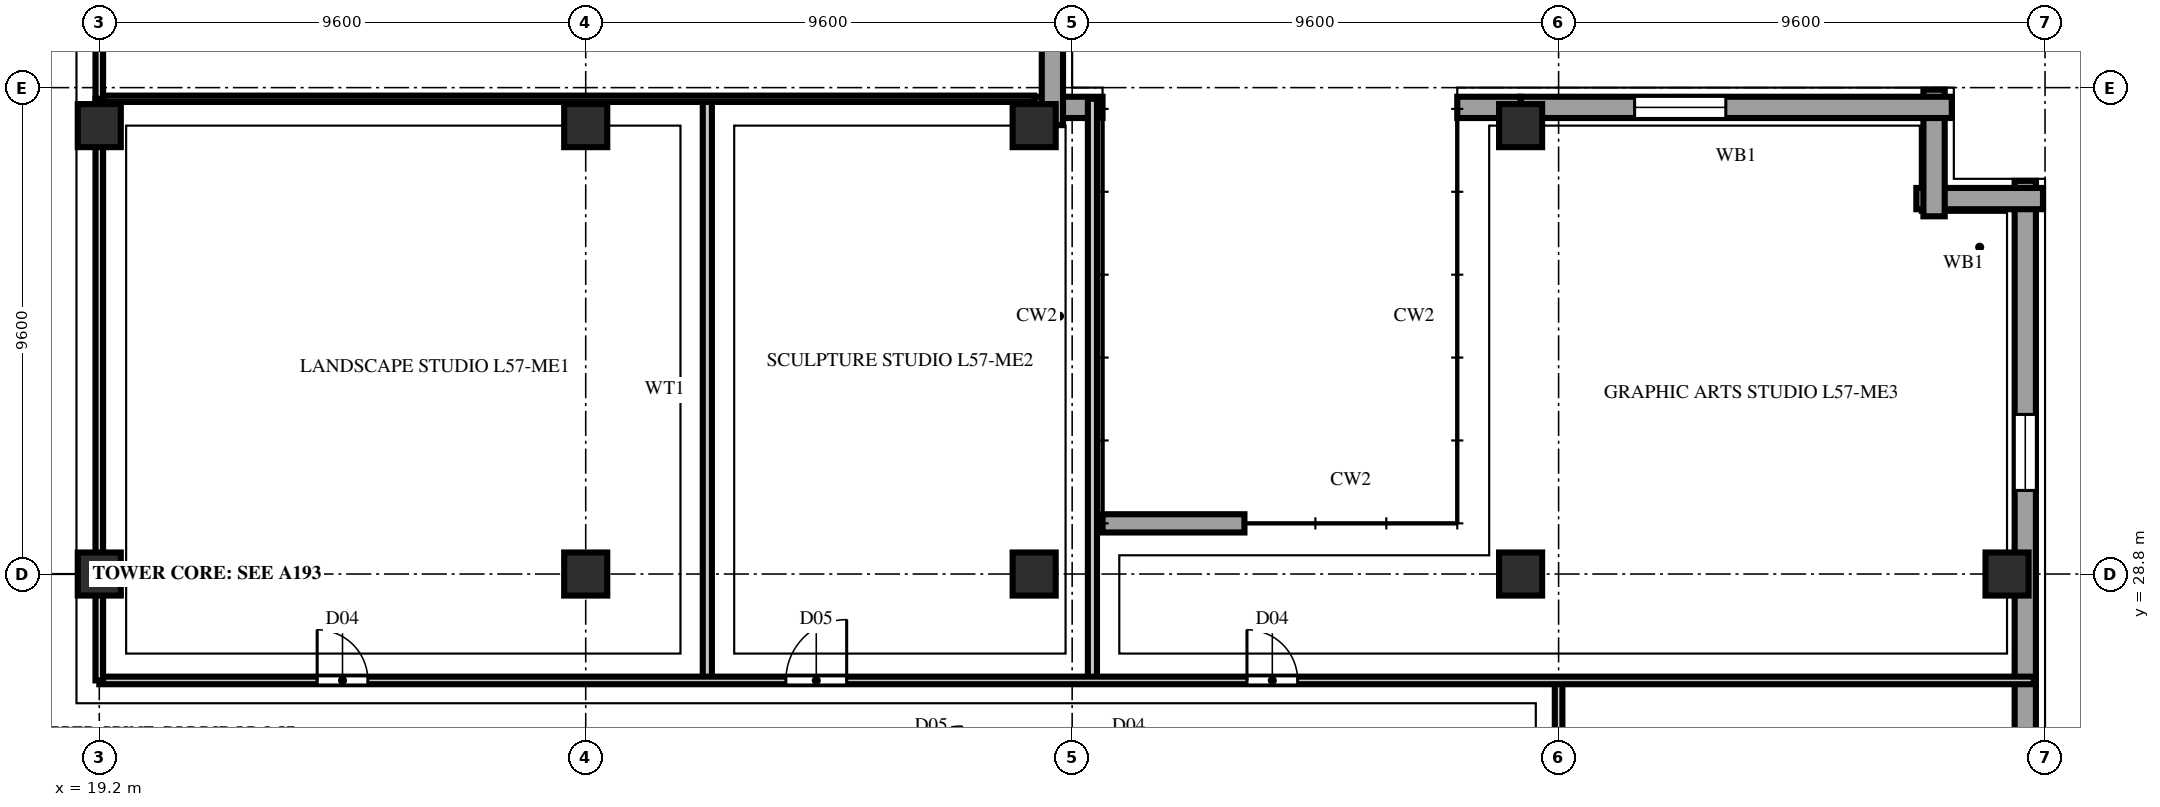
"""IFC4 building model, lengths in metres.
Left out: names, types, materials, properties, quantities, classifications, styles, units other than length and angle.
Written with IfcOpenShell. Run it as: python <this file> out.ifc"""

import sys

from ifc_helpers import new_model, si_unit, direction, frame, frame_2d, origin, origin_2d, place, context, subcontext, project, spatial, rectangle, extrude, element, fill, save


model = new_model("IFC4")
c1 = context("Model", 3, precision=1e-05, world=origin(), true_north=direction((0.0, 1.0)))
c2 = subcontext(c1, "Body", "Model", "MODEL_VIEW")
j1 = project(units=[si_unit("LENGTHUNIT", "METRE"), si_unit("PLANEANGLEUNIT", "RADIAN")], contexts=[c1])
p1 = place(None, origin())
s1 = spatial("IfcSite", under=j1, at=p1, CompositionType="ELEMENT")
p2 = place(p1, origin())
s2 = spatial("IfcBuilding", under=s1, at=p2, CompositionType="ELEMENT")
p3 = place(p2, frame((0.0, 0.0, 225.6)))
s3 = spatial("IfcBuildingStorey", under=s2, at=p3, CompositionType="ELEMENT", Elevation=225.6)
for number, where, z_axis, x_axis in (
    (1, (19.2, 28.8, 0.0), (0.0, 0.0, 1.0), (1.0, 0.0, 0.0)),
    (2, (19.2, 37.65, 0.0), (0.0, 0.0, 1.0), (1.0, 0.0, 0.0)),
    (3, (28.8, 28.8, 0.0), (0.0, 0.0, 1.0), (1.0, 0.0, 0.0)),
    (4, (28.8, 37.65, 0.0), (0.0, 0.0, 1.0), (1.0, 0.0, 0.0)),
    (5, (37.65, 28.8, 0.0), (0.0, 0.0, 1.0), (1.0, 0.0, 0.0)),
    (6, (37.65, 37.65, 0.0), (0.0, 0.0, 1.0), (1.0, 0.0, 0.0)),
    (7, (47.25, 28.8, 0.0), (0.0, 0.0, 1.0), (1.0, 0.0, 0.0)),
    (8, (47.25, 37.65, 0.0), (0.0, 0.0, 1.0), (1.0, 0.0, 0.0)),
    (9, (56.85, 28.8, 0.0), (0.0, 0.0, 1.0), (1.0, 0.0, 0.0)),
):
    element("IfcColumn", number, at=place(p3, frame(where, z_axis=z_axis, x_axis=x_axis)), inside=s3, PredefinedType="COLUMN", context=c2, shape_type="SweptSolid", body=[
        extrude(rectangle(XDim=0.85, YDim=0.85, at=origin_2d()), origin(), (0.0, 0.0, 1.0), 3.8),
    ])
p4 = place(p3, frame((57.21, 1.84, 0.0), z_axis=(0.0, 0.0, 1.0), x_axis=(0.0, 1.0, 0.0)))
e10 = element("IfcWall", 10, at=p4, inside=s3, PredefinedType="SOLIDWALL", context=c2, shape_type="SweptSolid", body=[
    extrude(rectangle(XDim=34.72, YDim=0.42, at=frame_2d((17.36, 0.0))), origin(), (0.0, 0.0, 1.0), 3.54),
])
p5 = place(p4, frame((4.61, 0.0, 0.85)))
e11 = element("IfcOpeningElement", 11, at=p5, cuts=e10, PredefinedType="OPENING", context=c2, shape_type="SweptSolid", body=[
    extrude(rectangle(XDim=1.5, YDim=1.85, at=frame_2d((0.75, 0.925))), frame((0.0, 0.222, 0.0), z_axis=(0.0, -1.0, 0.0), x_axis=(1.0, 0.0, 0.0)), (0.0, 0.0, 1.0), 0.444),
])
p6 = place(p4, frame((9.41, 0.0, 0.85)))
e12 = element("IfcOpeningElement", 12, at=p6, cuts=e10, PredefinedType="OPENING", context=c2, shape_type="SweptSolid", body=[
    extrude(rectangle(XDim=1.5, YDim=1.85, at=frame_2d((0.75, 0.925))), frame((0.0, 0.222, 0.0), z_axis=(0.0, -1.0, 0.0), x_axis=(1.0, 0.0, 0.0)), (0.0, 0.0, 1.0), 0.444),
])
p7 = place(p4, frame((14.21, 0.0, 0.85)))
e13 = element("IfcOpeningElement", 13, at=p7, cuts=e10, PredefinedType="OPENING", context=c2, shape_type="SweptSolid", body=[
    extrude(rectangle(XDim=1.5, YDim=1.85, at=frame_2d((0.75, 0.925))), frame((0.0, 0.222, 0.0), z_axis=(0.0, -1.0, 0.0), x_axis=(1.0, 0.0, 0.0)), (0.0, 0.0, 1.0), 0.444),
])
p8 = place(p4, frame((19.01, 0.0, 0.85)))
e14 = element("IfcOpeningElement", 14, at=p8, cuts=e10, PredefinedType="OPENING", context=c2, shape_type="SweptSolid", body=[
    extrude(rectangle(XDim=1.5, YDim=1.85, at=frame_2d((0.75, 0.925))), frame((0.0, 0.222, 0.0), z_axis=(0.0, -1.0, 0.0), x_axis=(1.0, 0.0, 0.0)), (0.0, 0.0, 1.0), 0.444),
])
p9 = place(p4, frame((28.61, 0.0, 0.85)))
e15 = element("IfcOpeningElement", 15, at=p9, cuts=e10, PredefinedType="OPENING", context=c2, shape_type="SweptSolid", body=[
    extrude(rectangle(XDim=1.5, YDim=1.85, at=frame_2d((0.75, 0.925))), frame((0.0, 0.222, 0.0), z_axis=(0.0, -1.0, 0.0), x_axis=(1.0, 0.0, 0.0)), (0.0, 0.0, 1.0), 0.444),
])
for number, where, z_axis, x_axis in (
    (16, (57.56, 36.21, 0.0), (0.0, 0.0, 1.0), (-1.0, 0.0, 0.0)),
    (17, (55.41, 35.86, 0.0), (0.0, 0.0, 1.0), (0.0, 1.0, 0.0)),
):
    element("IfcWall", number, at=place(p3, frame(where, z_axis=z_axis, x_axis=x_axis)), inside=s3, PredefinedType="SOLIDWALL", context=c2, shape_type="SweptSolid", body=[
        extrude(rectangle(XDim=2.5, YDim=0.42, at=frame_2d((1.25, 0.0))), origin(), (0.0, 0.0, 1.0), 3.54),
    ])
p10 = place(p3, frame((55.76, 38.01, 0.0), z_axis=(0.0, 0.0, 1.0), x_axis=(-1.0, 0.0, 0.0)))
e18 = element("IfcWall", 18, at=p10, inside=s3, PredefinedType="SOLIDWALL", context=c2, shape_type="SweptSolid", body=[
    extrude(rectangle(XDim=8.51, YDim=0.42, at=frame_2d((4.255, 0.0))), origin(), (0.0, 0.0, 1.0), 3.54),
])
p11 = place(p10, frame((4.46, 0.0, 0.85)))
e19 = element("IfcOpeningElement", 19, at=p11, cuts=e18, PredefinedType="OPENING", context=c2, shape_type="SweptSolid", body=[
    extrude(rectangle(XDim=1.8, YDim=1.85, at=frame_2d((0.9, 0.925))), frame((0.0, 0.222, 0.0), z_axis=(0.0, -1.0, 0.0), x_axis=(1.0, 0.0, 0.0)), (0.0, 0.0, 1.0), 0.444),
])
p12 = place(p3, frame((39.0, 38.01, 0.0), z_axis=(0.0, 0.0, 1.0), x_axis=(-1.0, 0.0, 0.0)))
e20 = element("IfcWall", 20, at=p12, inside=s3, PredefinedType="SOLIDWALL", context=c2, shape_type="SweptSolid", body=[
    extrude(rectangle(XDim=1.34, YDim=0.42, at=frame_2d((0.67, 0.0))), origin(), (0.0, 0.0, 1.0), 2.14),
])
p13 = place(p3, frame((38.01, 37.66, 0.0), z_axis=(0.0, 0.0, 1.0), x_axis=(0.0, 1.0, 0.0)))
e21 = element("IfcWall", 21, at=p13, inside=s3, PredefinedType="SOLIDWALL", context=c2, shape_type="SweptSolid", body=[
    extrude(rectangle(XDim=18.1, YDim=0.42, at=frame_2d((9.05, 0.0))), origin(), (0.0, 0.0, 1.0), 3.54),
])
p14 = place(p13, frame((2.24, 0.0, 0.85)))
e22 = element("IfcOpeningElement", 22, at=p14, cuts=e21, PredefinedType="OPENING", context=c2, shape_type="SweptSolid", body=[
    extrude(rectangle(XDim=1.8, YDim=1.85, at=frame_2d((0.9, 0.925))), frame((0.0, 0.222, 0.0), z_axis=(0.0, -1.0, 0.0), x_axis=(1.0, 0.0, 0.0)), (0.0, 0.0, 1.0), 0.444),
])
p15 = place(p13, frame((7.04, 0.0, 0.85)))
e23 = element("IfcOpeningElement", 23, at=p15, cuts=e21, PredefinedType="OPENING", context=c2, shape_type="SweptSolid", body=[
    extrude(rectangle(XDim=1.8, YDim=1.85, at=frame_2d((0.9, 0.925))), frame((0.0, 0.222, 0.0), z_axis=(0.0, -1.0, 0.0), x_axis=(1.0, 0.0, 0.0)), (0.0, 0.0, 1.0), 0.444),
])
p16 = place(p13, frame((11.84, 0.0, 0.85)))
e24 = element("IfcOpeningElement", 24, at=p16, cuts=e21, PredefinedType="OPENING", context=c2, shape_type="SweptSolid", body=[
    extrude(rectangle(XDim=1.8, YDim=1.85, at=frame_2d((0.9, 0.925))), frame((0.0, 0.222, 0.0), z_axis=(0.0, -1.0, 0.0), x_axis=(1.0, 0.0, 0.0)), (0.0, 0.0, 1.0), 0.444),
])
p17 = place(p3, frame((39.0, 29.8, 0.0), z_axis=(0.0, 0.0, 1.0), x_axis=(1.0, 0.0, 0.0)))
e25 = element("IfcWall", 25, at=p17, inside=s3, PredefinedType="SOLIDWALL", context=c2, shape_type="SweptSolid", body=[
    extrude(rectangle(XDim=2.8, YDim=0.36, at=frame_2d((1.4, 0.0))), origin(), (0.0, 0.0, 1.0), 3.54),
])
p18 = place(p3, frame((48.0, 24.6, 0.0), z_axis=(0.0, 0.0, 1.0), x_axis=(0.0, 1.0, 0.0)))
e26 = element("IfcWall", 26, at=p18, inside=s3, PredefinedType="PARTITIONING", context=c2, shape_type="SweptSolid", body=[
    extrude(rectangle(XDim=2.1, YDim=0.15, at=frame_2d((1.05, 0.0))), origin(), (0.0, 0.0, 1.0), 3.54),
])
for number, where, z_axis, x_axis in (
    (27, (31.2, 26.7, 0.0), (0.0, 0.0, 1.0), (0.0, 1.0, 0.0)),
    (28, (38.8, 26.7, 0.0), (0.0, 0.0, 1.0), (0.0, 1.0, 0.0)),
):
    element("IfcWall", number, at=place(p3, frame(where, z_axis=z_axis, x_axis=x_axis)), inside=s3, PredefinedType="PARTITIONING", context=c2, shape_type="SweptSolid", body=[
        extrude(rectangle(XDim=11.48, YDim=0.18, at=frame_2d((5.74, 0.0))), origin(), (0.0, 0.0, 1.0), 3.54),
    ])
p19 = place(p3, frame((19.2, 26.7, 0.0), z_axis=(0.0, 0.0, 1.0), x_axis=(1.0, 0.0, 0.0)))
e29 = element("IfcWall", 29, at=p19, inside=s3, PredefinedType="PARTITIONING", context=c2, shape_type="SweptSolid", body=[
    extrude(rectangle(XDim=38.18, YDim=0.15, at=frame_2d((19.09, 0.0))), origin(), (0.0, 0.0, 1.0), 3.54),
])
p20 = place(p19, frame((4.3, 0.0, 0.0)))
e30 = element("IfcOpeningElement", 30, at=p20, cuts=e29, PredefinedType="OPENING", context=c2, shape_type="SweptSolid", body=[
    extrude(rectangle(XDim=1.0, YDim=2.2, at=frame_2d((0.5, 1.1))), frame((0.0, 0.087, 0.0), z_axis=(0.0, -1.0, 0.0), x_axis=(1.0, 0.0, 0.0)), (0.0, 0.0, 1.0), 0.174),
])
p21 = place(p19, frame((13.55, 0.0, 0.0)))
e31 = element("IfcOpeningElement", 31, at=p21, cuts=e29, PredefinedType="OPENING", context=c2, shape_type="SweptSolid", body=[
    extrude(rectangle(XDim=1.2, YDim=2.2, at=frame_2d((0.6, 1.1))), frame((0.0, 0.087, 0.0), z_axis=(0.0, -1.0, 0.0), x_axis=(1.0, 0.0, 0.0)), (0.0, 0.0, 1.0), 0.174),
])
p22 = place(p19, frame((22.65, 0.0, 0.0)))
e32 = element("IfcOpeningElement", 32, at=p22, cuts=e29, PredefinedType="OPENING", context=c2, shape_type="SweptSolid", body=[
    extrude(rectangle(XDim=1.0, YDim=2.2, at=frame_2d((0.5, 1.1))), frame((0.0, 0.087, 0.0), z_axis=(0.0, -1.0, 0.0), x_axis=(1.0, 0.0, 0.0)), (0.0, 0.0, 1.0), 0.174),
])
p23 = place(p3, frame((19.2, 26.7, 0.0), z_axis=(0.0, 0.0, 1.0), x_axis=(0.0, 1.0, 0.0)))
e33 = element("IfcWall", 33, at=p23, inside=s3, PredefinedType="PARTITIONING", context=c2, shape_type="SweptSolid", body=[
    extrude(rectangle(XDim=11.48, YDim=0.15, at=frame_2d((5.74, 0.0))), origin(), (0.0, 0.0, 1.0), 2.923),
])
p24 = place(p3, frame((19.28, 38.18, 0.0), z_axis=(0.0, 0.0, 1.0), x_axis=(1.0, 0.0, 0.0)))
e34 = element("IfcWall", 34, at=p24, inside=s3, PredefinedType="PARTITIONING", context=c2, shape_type="SweptSolid", body=[
    extrude(rectangle(XDim=18.37, YDim=0.125, at=frame_2d((9.185, 0.0))), origin(), (0.0, 0.0, 1.0), 3.54),
])
p25 = place(p3, frame((19.2, 38.18, 0.0), z_axis=(0.0, 0.0, 1.0), x_axis=(0.0, 1.0, 0.0)))
e35 = element("IfcWall", 35, at=p25, inside=s3, PredefinedType="PARTITIONING", context=c2, shape_type="SweptSolid", body=[
    extrude(rectangle(XDim=18.67, YDim=0.15, at=frame_2d((9.335, 0.0))), origin(), (0.0, 0.0, 1.0), 2.923),
])
p26 = place(p25, frame((3.75, 0.0, 0.0)))
e36 = element("IfcOpeningElement", 36, at=p26, cuts=e35, PredefinedType="OPENING", context=c2, shape_type="SweptSolid", body=[
    extrude(rectangle(XDim=0.95, YDim=2.15, at=frame_2d((0.475, 1.075))), frame((0.0, 0.087, 0.0), z_axis=(0.0, -1.0, 0.0), x_axis=(1.0, 0.0, 0.0)), (0.0, 0.0, 1.0), 0.174),
])
p27 = place(p3, frame((47.25, 38.01, 0.0), z_axis=(0.0, 0.0, 1.0), x_axis=(-1.0, 0.0, 0.0)))
e37 = element("IfcWall", 37, at=p27, inside=s3, PredefinedType="SOLIDWALL", context=c2, shape_type="SweptSolid", body=[
    extrude(rectangle(XDim=1.25, YDim=0.42, at=frame_2d((0.625, 0.0))), origin(), (0.0, 0.0, 1.0), 2.14),
])
p28 = place(p9, origin())
e38 = element("IfcWindow", 38, at=p28, inside=s3, PartitioningType="DOUBLE_PANEL_VERTICAL", PredefinedType="WINDOW", context=c2, shape_type="SweptSolid", body=[
    extrude(rectangle(XDim=1.5, YDim=1.85, at=frame_2d((0.75, 0.925))), frame((0.0, 0.11, 0.0), z_axis=(0.0, -1.0, 0.0), x_axis=(1.0, 0.0, 0.0)), (0.0, 0.0, 1.0), 0.06),
])
fill(e15, e38)
p29 = place(p11, origin())
e39 = element("IfcWindow", 39, at=p29, inside=s3, PartitioningType="DOUBLE_PANEL_VERTICAL", PredefinedType="WINDOW", context=c2, shape_type="SweptSolid", body=[
    extrude(rectangle(XDim=1.8, YDim=1.85, at=frame_2d((0.9, 0.925))), frame((0.0, 0.11, 0.0), z_axis=(0.0, -1.0, 0.0), x_axis=(1.0, 0.0, 0.0)), (0.0, 0.0, 1.0), 0.06),
])
fill(e19, e39)
p30 = place(p20, origin())
e40 = element("IfcDoor", 40, at=p30, inside=s3, OperationType="SINGLE_SWING_LEFT", PredefinedType="DOOR", context=c2, shape_type="SweptSolid", body=[
    extrude(rectangle(XDim=1.0, YDim=2.2, at=frame_2d((0.5, 1.1))), frame((0.0, 0.025, 0.0), z_axis=(0.0, -1.0, 0.0), x_axis=(1.0, 0.0, 0.0)), (0.0, 0.0, 1.0), 0.05),
])
fill(e30, e40)
p31 = place(p21, origin())
e41 = element("IfcDoor", 41, at=p31, inside=s3, OperationType="SINGLE_SWING_RIGHT", PredefinedType="DOOR", context=c2, shape_type="SweptSolid", body=[
    extrude(rectangle(XDim=1.2, YDim=2.2, at=frame_2d((0.6, 1.1))), frame((0.0, 0.025, 0.0), z_axis=(0.0, -1.0, 0.0), x_axis=(1.0, 0.0, 0.0)), (0.0, 0.0, 1.0), 0.05),
])
fill(e31, e41)
p32 = place(p22, origin())
e42 = element("IfcDoor", 42, at=p32, inside=s3, OperationType="SINGLE_SWING_LEFT", PredefinedType="DOOR", context=c2, shape_type="SweptSolid", body=[
    extrude(rectangle(XDim=1.0, YDim=2.2, at=frame_2d((0.5, 1.1))), frame((0.0, 0.025, 0.0), z_axis=(0.0, -1.0, 0.0), x_axis=(1.0, 0.0, 0.0)), (0.0, 0.0, 1.0), 0.05),
])
fill(e32, e42)
save(model, sys.argv[1])
